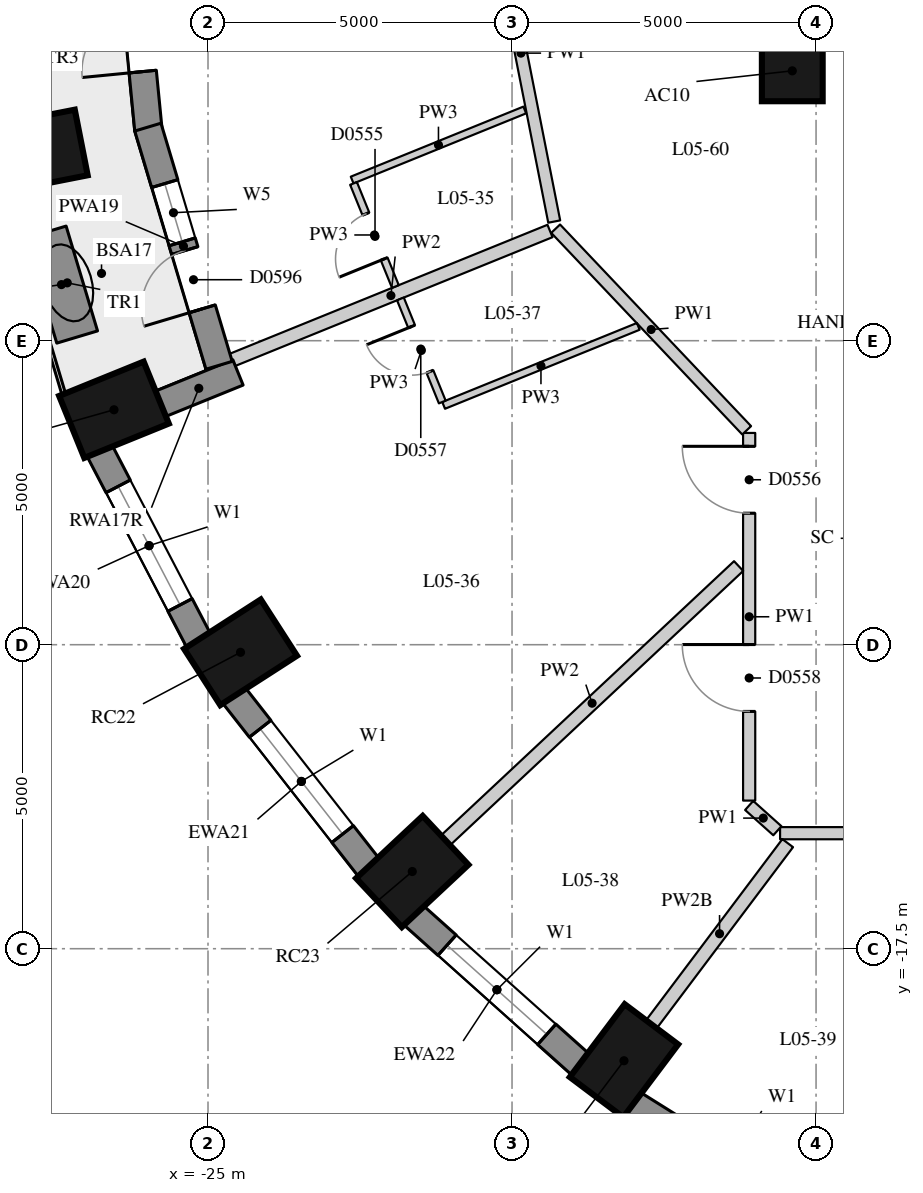
"""IFC4 building model, lengths in metres.
Left out: names, types, materials, properties, quantities, classifications, styles, units other than length and angle.
Written with IfcOpenShell. Run it as: python <this file> out.ifc"""

import sys

from ifc_helpers import new_model, si_unit, direction, frame, frame_2d, origin, origin_2d, place, context, subcontext, project, spatial, rectangle, extrude, element, fill, save


model = new_model("IFC4")
c1 = context("Model", 3, precision=1e-05, world=origin(), true_north=direction((0.0, 1.0)))
c2 = subcontext(c1, "Body", "Model", "MODEL_VIEW")
j1 = project(units=[si_unit("LENGTHUNIT", "METRE"), si_unit("PLANEANGLEUNIT", "RADIAN")], contexts=[c1])
p1 = place(None, origin())
s1 = spatial("IfcSite", under=j1, at=p1, CompositionType="ELEMENT")
p2 = place(p1, origin())
s2 = spatial("IfcBuilding", under=s1, at=p2, CompositionType="ELEMENT")
p3 = place(p2, frame((0.0, 0.0, 25.0)))
s3 = spatial("IfcBuildingStorey", under=s2, at=p3, CompositionType="ELEMENT", Elevation=25.0)
for number, where, z_axis, x_axis in (
    (1, (-27.821, -4.385, 0.0), (0.0, 0.0, 1.0), (-0.981, -0.193, 0.0)),
    (2, (-26.546, -8.636, 0.0), (0.0, 0.0, 1.0), (-0.927, -0.376, 0.0)),
    (3, (-24.465, -12.625, 0.0), (0.0, 0.0, 1.0), (-0.841, -0.541, 0.0)),
    (4, (-21.641, -16.23, 0.0), (0.0, 0.0, 1.0), (-0.73, -0.683, 0.0)),
    (5, (-18.159, -19.343, 0.0), (0.0, 0.0, 1.0), (-0.601, -0.799, 0.0)),
):
    element("IfcColumn", number, at=place(p3, frame(where, z_axis=z_axis, x_axis=x_axis)), inside=s3, PredefinedType="COLUMN", context=c2, shape_type="SweptSolid", body=[
        extrude(rectangle(XDim=1.5, YDim=1.1, at=origin_2d()), origin(), (0.0, 0.0, 1.0), 3.3),
    ])
p4 = place(p3, frame((-15.391, -3.062, 0.0), z_axis=(0.0, 0.0, 1.0), x_axis=(1.0, 0.0, 0.0)))
e6 = element("IfcColumn", 6, at=p4, inside=s3, PredefinedType="COLUMN", context=c2, shape_type="SweptSolid", body=[
    extrude(rectangle(XDim=1.0, YDim=1.0, at=origin_2d()), origin(), (0.0, 0.0, 1.0), 3.3),
])
p5 = place(p3, frame((-26.786, -9.305, 0.0), z_axis=(0.0, 0.0, 1.0), x_axis=(0.462492775226, -0.886623050041, 0.0)))
e7 = element("IfcWall", 7, at=p5, inside=s3, PredefinedType="SOLIDWALL", context=c2, shape_type="SweptSolid", body=[
    extrude(rectangle(XDim=3.532, YDim=0.45, at=frame_2d((1.766, 0.0))), origin(), (0.0, 0.0, 1.0), 3.02),
])
p6 = place(p5, frame((0.666, 0.0, 0.4)))
e8 = element("IfcOpeningElement", 8, at=p6, cuts=e7, PredefinedType="OPENING", context=c2, shape_type="SweptSolid", body=[
    extrude(rectangle(XDim=2.2, YDim=1.75, at=frame_2d((1.1, 0.875))), frame((0.0, 0.235, 0.0), z_axis=(0.0, -1.0, 0.0), x_axis=(1.0, 0.0, 0.0)), (0.0, 0.0, 1.0), 0.47),
])
p7 = place(p3, frame((-24.578, -13.328, 0.0), z_axis=(0.0, 0.0, 1.0), x_axis=(0.616661975264, -0.787228053529, 0.0)))
e9 = element("IfcWall", 9, at=p7, inside=s3, PredefinedType="SOLIDWALL", context=c2, shape_type="SweptSolid", body=[
    extrude(rectangle(XDim=3.61, YDim=0.45, at=frame_2d((1.805, 0.0))), origin(), (0.0, 0.0, 1.0), 3.02),
])
p8 = place(p7, frame((0.705, 0.0, 0.4)))
e10 = element("IfcOpeningElement", 10, at=p8, cuts=e9, PredefinedType="OPENING", context=c2, shape_type="SweptSolid", body=[
    extrude(rectangle(XDim=2.2, YDim=1.75, at=frame_2d((1.1, 0.875))), frame((0.0, 0.235, 0.0), z_axis=(0.0, -1.0, 0.0), x_axis=(1.0, 0.0, 0.0)), (0.0, 0.0, 1.0), 0.47),
])
p9 = place(p3, frame((-21.627, -16.943, 0.0), z_axis=(0.0, 0.0, 1.0), x_axis=(0.745526233716, -0.66647628228, 0.0)))
e11 = element("IfcWall", 11, at=p9, inside=s3, PredefinedType="SOLIDWALL", context=c2, shape_type="SweptSolid", body=[
    extrude(rectangle(XDim=3.697, YDim=0.45, at=frame_2d((1.848, 0.0))), origin(), (0.0, 0.0, 1.0), 3.02),
])
p10 = place(p9, frame((0.749, 0.0, 0.4)))
e12 = element("IfcOpeningElement", 12, at=p10, cuts=e11, PredefinedType="OPENING", context=c2, shape_type="SweptSolid", body=[
    extrude(rectangle(XDim=2.2, YDim=1.75, at=frame_2d((1.1, 0.875))), frame((0.0, 0.235, 0.0), z_axis=(0.0, -1.0, 0.0), x_axis=(1.0, 0.0, 0.0)), (0.0, 0.0, 1.0), 0.47),
])
p11 = place(p3, frame((-18.023, -20.044, 0.0), z_axis=(0.0, 0.0, 1.0), x_axis=(0.847635480093, -0.530579016629, 0.0)))
e13 = element("IfcWall", 13, at=p11, inside=s3, PredefinedType="SOLIDWALL", context=c2, shape_type="SweptSolid", body=[
    extrude(rectangle(XDim=3.782, YDim=0.45, at=frame_2d((1.891, 0.0))), origin(), (0.0, 0.0, 1.0), 3.02),
])
p12 = place(p11, frame((0.791, 0.0, 0.4)))
e14 = element("IfcOpeningElement", 14, at=p12, cuts=e13, PredefinedType="OPENING", context=c2, shape_type="SweptSolid", body=[
    extrude(rectangle(XDim=2.2, YDim=1.75, at=frame_2d((1.1, 0.875))), frame((0.0, 0.235, 0.0), z_axis=(0.0, -1.0, 0.0), x_axis=(1.0, 0.0, 0.0)), (0.0, 0.0, 1.0), 0.47),
])
p13 = place(p3, frame((-25.796, -8.544, 0.0), z_axis=(0.0, 0.0, 1.0), x_axis=(0.926575599743, 0.376108572039, 0.0)))
e15 = element("IfcWall", 15, at=p13, inside=s3, PredefinedType="SOLIDWALL", context=c2, shape_type="SweptSolid", body=[
    extrude(rectangle(XDim=1.39, YDim=0.45, at=frame_2d((0.695, 0.0))), origin(), (0.0, 0.0, 1.0), 3.02),
])
p14 = place(p3, frame((-26.376, 0.022, 0.0), z_axis=(0.0, 0.0, 1.0), x_axis=(0.097092719726, -0.995275340685, 0.0)))
e16 = element("IfcWall", 16, at=p14, inside=s3, PredefinedType="SOLIDWALL", context=c2, shape_type="SweptSolid", body=[
    extrude(rectangle(XDim=4.071, YDim=0.45, at=frame_2d((2.036, 0.0))), origin(), (0.0, 0.0, 1.0), 3.02),
])
p15 = place(p14, frame((0.96, 0.0, 0.4)))
e17 = element("IfcOpeningElement", 17, at=p15, cuts=e16, PredefinedType="OPENING", context=c2, shape_type="SweptSolid", body=[
    extrude(rectangle(XDim=1.0, YDim=1.75, at=frame_2d((0.5, 0.875))), frame((0.0, 0.235, 0.0), z_axis=(0.0, -1.0, 0.0), x_axis=(1.0, 0.0, 0.0)), (0.0, 0.0, 1.0), 0.47),
])
p16 = place(p14, frame((2.111, 0.0, 0.0)))
e18 = element("IfcOpeningElement", 18, at=p16, cuts=e16, PredefinedType="OPENING", context=c2, shape_type="SweptSolid", body=[
    extrude(rectangle(XDim=1.0, YDim=2.15, at=frame_2d((0.5, 1.075))), frame((0.0, 0.235, 0.0), z_axis=(0.0, -1.0, 0.0), x_axis=(1.0, 0.0, 0.0)), (0.0, 0.0, 1.0), 0.47),
])
p17 = place(p3, frame((-25.989, -3.987, 0.0), z_axis=(0.0, 0.0, 1.0), x_axis=(0.286427456555, -0.958101932015, 0.0)))
e19 = element("IfcWall", 19, at=p17, inside=s3, PredefinedType="SOLIDWALL", context=c2, shape_type="SweptSolid", body=[
    extrude(rectangle(XDim=4.089, YDim=0.45, at=frame_2d((2.044, 0.0))), origin(), (0.0, 0.0, 1.0), 3.02),
])
p18 = place(p17, frame((0.969, 0.0, 0.4)))
e20 = element("IfcOpeningElement", 20, at=p18, cuts=e19, PredefinedType="OPENING", context=c2, shape_type="SweptSolid", body=[
    extrude(rectangle(XDim=1.0, YDim=1.75, at=frame_2d((0.5, 0.875))), frame((0.0, 0.235, 0.0), z_axis=(0.0, -1.0, 0.0), x_axis=(1.0, 0.0, 0.0)), (0.0, 0.0, 1.0), 0.47),
])
p19 = place(p17, frame((2.119, 0.0, 0.0)))
e21 = element("IfcOpeningElement", 21, at=p19, cuts=e19, PredefinedType="OPENING", context=c2, shape_type="SweptSolid", body=[
    extrude(rectangle(XDim=1.0, YDim=2.15, at=frame_2d((0.5, 1.075))), frame((0.0, 0.235, 0.0), z_axis=(0.0, -1.0, 0.0), x_axis=(1.0, 0.0, 0.0)), (0.0, 0.0, 1.0), 0.47),
])
p20 = place(p3, frame((-27.669, -5.715, 0.0), z_axis=(0.0, 0.0, 1.0), x_axis=(0.287024312863, -0.957923297465, 0.0)))
e22 = element("IfcWall", 22, at=p20, inside=s3, PredefinedType="USERDEFINED", context=c2, shape_type="SweptSolid", body=[
    extrude(rectangle(XDim=1.8, YDim=0.7, at=frame_2d((0.9, 0.0))), origin(), (0.0, 0.0, 1.0), 0.75),
])
p21 = place(p3, frame((-7.92, -15.6, 0.0), z_axis=(0.0, 0.0, 1.0), x_axis=(-1.0, 0.0, 0.0)))
e23 = element("IfcWall", 23, at=p21, inside=s3, PredefinedType="PARTITIONING", context=c2, shape_type="SweptSolid", body=[
    extrude(rectangle(XDim=7.672, YDim=0.2, at=frame_2d((3.836, 0.0))), origin(), (0.0, 0.0, 1.0), 3.02),
])
p22 = place(p21, frame((5.537, 0.0, 0.0)))
e24 = element("IfcOpeningElement", 24, at=p22, cuts=e23, PredefinedType="OPENING", context=c2, shape_type="SweptSolid", body=[
    extrude(rectangle(XDim=1.0, YDim=2.1, at=frame_2d((0.5, 1.05))), frame((0.0, 0.11, 0.0), z_axis=(0.0, -1.0, 0.0), x_axis=(1.0, 0.0, 0.0)), (0.0, 0.0, 1.0), 0.22),
])
p23 = place(p21, frame((1.036, 0.0, 0.0)))
e25 = element("IfcOpeningElement", 25, at=p23, cuts=e23, PredefinedType="OPENING", context=c2, shape_type="SweptSolid", body=[
    extrude(rectangle(XDim=0.9, YDim=2.1, at=frame_2d((0.45, 1.05))), frame((0.0, 0.11, 0.0), z_axis=(0.0, -1.0, 0.0), x_axis=(1.0, 0.0, 0.0)), (0.0, 0.0, 1.0), 0.22),
])
p24 = place(p3, frame((-15.636, -15.56, 0.0), z_axis=(0.0, 0.0, 1.0), x_axis=(-0.744656758283, 0.667447610187, 0.0)))
e26 = element("IfcWall", 26, at=p24, inside=s3, PredefinedType="PARTITIONING", context=c2, shape_type="SweptSolid", body=[
    extrude(rectangle(XDim=0.623, YDim=0.2, at=frame_2d((0.312, 0.0))), origin(), (0.0, 0.0, 1.0), 3.02),
])
p25 = place(p3, frame((-16.1, -15.064, 0.0), z_axis=(0.0, 0.0, 1.0), x_axis=(0.0, 1.0, 0.0)))
e27 = element("IfcWall", 27, at=p25, inside=s3, PredefinedType="PARTITIONING", context=c2, shape_type="SweptSolid", body=[
    extrude(rectangle(XDim=6.047, YDim=0.2, at=frame_2d((3.023, 0.0))), origin(), (0.0, 0.0, 1.0), 3.02),
])
p26 = place(p25, frame((4.727, 0.0, 0.0)))
e28 = element("IfcOpeningElement", 28, at=p26, cuts=e27, PredefinedType="OPENING", context=c2, shape_type="SweptSolid", body=[
    extrude(rectangle(XDim=1.1, YDim=2.1, at=frame_2d((0.55, 1.05))), frame((0.0, 0.11, 0.0), z_axis=(0.0, -1.0, 0.0), x_axis=(1.0, 0.0, 0.0)), (0.0, 0.0, 1.0), 0.22),
])
p27 = place(p25, frame((1.467, 0.0, 0.0)))
e29 = element("IfcOpeningElement", 29, at=p27, cuts=e27, PredefinedType="OPENING", context=c2, shape_type="SweptSolid", body=[
    extrude(rectangle(XDim=1.1, YDim=2.1, at=frame_2d((0.55, 1.05))), frame((0.0, 0.11, 0.0), z_axis=(0.0, -1.0, 0.0), x_axis=(1.0, 0.0, 0.0)), (0.0, 0.0, 1.0), 0.22),
])
p28 = place(p3, frame((-16.141, -8.974, 0.0), z_axis=(0.0, 0.0, 1.0), x_axis=(-0.687741683024, 0.725955492735, 0.0)))
e30 = element("IfcWall", 30, at=p28, inside=s3, PredefinedType="PARTITIONING", context=c2, shape_type="SweptSolid", body=[
    extrude(rectangle(XDim=4.568, YDim=0.2, at=frame_2d((2.284, 0.0))), origin(), (0.0, 0.0, 1.0), 3.02),
])
p29 = place(p3, frame((-19.306, -5.541, 0.0), z_axis=(0.0, 0.0, 1.0), x_axis=(-0.193671356151, 0.981066463501, 0.0)))
e31 = element("IfcWall", 31, at=p29, inside=s3, PredefinedType="PARTITIONING", context=c2, shape_type="SweptSolid", body=[
    extrude(rectangle(XDim=5.647, YDim=0.2, at=frame_2d((2.824, 0.0))), origin(), (0.0, 0.0, 1.0), 3.02),
])
p30 = place(p3, frame((-24.608, -7.82, 0.0), z_axis=(0.0, 0.0, 1.0), x_axis=(0.926565467624, 0.376133532415, 0.0)))
e32 = element("IfcWall", 32, at=p30, inside=s3, PredefinedType="PARTITIONING", context=c2, shape_type="SweptSolid", body=[
    extrude(rectangle(XDim=5.648, YDim=0.22, at=frame_2d((2.824, 0.0))), origin(), (0.0, 0.0, 1.0), 3.02),
])
p31 = place(p3, frame((-21.093, -15.718, 0.0), z_axis=(0.0, 0.0, 1.0), x_axis=(0.73009284205, 0.683347965525, 0.0)))
e33 = element("IfcWall", 33, at=p31, inside=s3, PredefinedType="PARTITIONING", context=c2, shape_type="SweptSolid", body=[
    extrude(rectangle(XDim=6.602, YDim=0.22, at=frame_2d((3.301, 0.0))), origin(), (0.0, 0.0, 1.0), 3.02),
])
p32 = place(p3, frame((-17.708, -18.743, 0.0), z_axis=(0.0, 0.0, 1.0), x_axis=(0.601172757903, 0.799119086967, 0.0)))
e34 = element("IfcWall", 34, at=p32, inside=s3, PredefinedType="PARTITIONING", context=c2, shape_type="SweptSolid", body=[
    extrude(rectangle(XDim=3.729, YDim=0.22, at=frame_2d((1.864, 0.0))), origin(), (0.0, 0.0, 1.0), 2.57),
])
p33 = place(p3, frame((-19.79, -3.705, 0.0), z_axis=(0.0, 0.0, 1.0), x_axis=(-0.926585481443, -0.37608422671, 0.0)))
e35 = element("IfcWall", 35, at=p33, inside=s3, PredefinedType="PARTITIONING", context=c2, shape_type="SweptSolid", body=[
    extrude(rectangle(XDim=3.064, YDim=0.12, at=frame_2d((1.532, 0.0))), origin(), (0.0, 0.0, 1.0), 3.02),
])
p34 = place(p3, frame((-17.924, -7.264, 0.0), z_axis=(0.0, 0.0, 1.0), x_axis=(-0.926548953408, -0.376174210891, 0.0)))
e36 = element("IfcWall", 36, at=p34, inside=s3, PredefinedType="PARTITIONING", context=c2, shape_type="SweptSolid", body=[
    extrude(rectangle(XDim=3.455, YDim=0.12, at=frame_2d((1.727, 0.0))), origin(), (0.0, 0.0, 1.0), 3.02),
])
p35 = place(p3, frame((-22.607, -4.913, 0.0), z_axis=(0.0, 0.0, 1.0), x_axis=(0.376216010002, -0.92653198208, 0.0)))
e37 = element("IfcWall", 37, at=p35, inside=s3, PredefinedType="PARTITIONING", context=c2, shape_type="SweptSolid", body=[
    extrude(rectangle(XDim=1.83, YDim=0.12, at=frame_2d((0.915, 0.0))), origin(), (0.0, 0.0, 1.0), 3.02),
])
p36 = place(p35, frame((0.54, 0.0, 0.0)))
e38 = element("IfcOpeningElement", 38, at=p36, cuts=e37, PredefinedType="OPENING", context=c2, shape_type="SweptSolid", body=[
    extrude(rectangle(XDim=0.8, YDim=2.1, at=frame_2d((0.4, 1.05))), frame((0.0, 0.07, 0.0), z_axis=(0.0, -1.0, 0.0), x_axis=(1.0, 0.0, 0.0)), (0.0, 0.0, 1.0), 0.14),
])
p37 = place(p3, frame((-21.147, -8.508, 0.0), z_axis=(0.0, 0.0, 1.0), x_axis=(-0.376216010002, 0.92653198208, 0.0)))
e39 = element("IfcWall", 39, at=p37, inside=s3, PredefinedType="PARTITIONING", context=c2, shape_type="SweptSolid", body=[
    extrude(rectangle(XDim=1.83, YDim=0.12, at=frame_2d((0.915, 0.0))), origin(), (0.0, 0.0, 1.0), 3.02),
])
p38 = place(p37, frame((0.54, 0.0, 0.0)))
e40 = element("IfcOpeningElement", 40, at=p38, cuts=e39, PredefinedType="OPENING", context=c2, shape_type="SweptSolid", body=[
    extrude(rectangle(XDim=0.8, YDim=2.1, at=frame_2d((0.4, 1.05))), frame((0.0, 0.07, 0.0), z_axis=(0.0, -1.0, 0.0), x_axis=(1.0, 0.0, 0.0)), (0.0, 0.0, 1.0), 0.14),
])
p39 = place(p6, origin())
e41 = element("IfcWindow", 41, at=p39, inside=s3, PartitioningType="SINGLE_PANEL", PredefinedType="WINDOW", context=c2, shape_type="SweptSolid", body=[
    extrude(rectangle(XDim=2.2, YDim=1.75, at=frame_2d((1.1, 0.875))), frame((0.0, 0.035, 0.0), z_axis=(0.0, -1.0, 0.0), x_axis=(1.0, 0.0, 0.0)), (0.0, 0.0, 1.0), 0.06),
])
fill(e8, e41)
p40 = place(p8, origin())
e42 = element("IfcWindow", 42, at=p40, inside=s3, PartitioningType="SINGLE_PANEL", PredefinedType="WINDOW", context=c2, shape_type="SweptSolid", body=[
    extrude(rectangle(XDim=2.2, YDim=1.75, at=frame_2d((1.1, 0.875))), frame((0.0, 0.035, 0.0), z_axis=(0.0, -1.0, 0.0), x_axis=(1.0, 0.0, 0.0)), (0.0, 0.0, 1.0), 0.06),
])
fill(e10, e42)
p41 = place(p10, origin())
e43 = element("IfcWindow", 43, at=p41, inside=s3, PartitioningType="SINGLE_PANEL", PredefinedType="WINDOW", context=c2, shape_type="SweptSolid", body=[
    extrude(rectangle(XDim=2.2, YDim=1.75, at=frame_2d((1.1, 0.875))), frame((0.0, 0.035, 0.0), z_axis=(0.0, -1.0, 0.0), x_axis=(1.0, 0.0, 0.0)), (0.0, 0.0, 1.0), 0.06),
])
fill(e12, e43)
p42 = place(p16, frame((1.0, 0.0, 0.0), z_axis=(0.0, 0.0, 1.0), x_axis=(-1.0, 0.0, 0.0)))
e44 = element("IfcDoor", 44, at=p42, inside=s3, OperationType="SINGLE_SWING_LEFT", PredefinedType="DOOR", context=c2, shape_type="SweptSolid", body=[
    extrude(rectangle(XDim=1.0, YDim=2.15, at=frame_2d((0.5, 1.075))), frame((0.0, 0.075, 0.0), z_axis=(0.0, -1.0, 0.0), x_axis=(1.0, 0.0, 0.0)), (0.0, 0.0, 1.0), 0.05),
])
fill(e18, e44)
p43 = place(p18, origin())
e45 = element("IfcWindow", 45, at=p43, inside=s3, PartitioningType="SINGLE_PANEL", PredefinedType="WINDOW", context=c2, shape_type="SweptSolid", body=[
    extrude(rectangle(XDim=1.0, YDim=1.75, at=frame_2d((0.5, 0.875))), frame((0.0, 0.035, 0.0), z_axis=(0.0, -1.0, 0.0), x_axis=(1.0, 0.0, 0.0)), (0.0, 0.0, 1.0), 0.06),
])
fill(e20, e45)
p44 = place(p19, frame((1.0, 0.0, 0.0), z_axis=(0.0, 0.0, 1.0), x_axis=(-1.0, 0.0, 0.0)))
e46 = element("IfcDoor", 46, at=p44, inside=s3, OperationType="SINGLE_SWING_LEFT", PredefinedType="DOOR", context=c2, shape_type="SweptSolid", body=[
    extrude(rectangle(XDim=1.0, YDim=2.15, at=frame_2d((0.5, 1.075))), frame((0.0, 0.075, 0.0), z_axis=(0.0, -1.0, 0.0), x_axis=(1.0, 0.0, 0.0)), (0.0, 0.0, 1.0), 0.05),
])
fill(e21, e46)
p45 = place(p36, origin())
e47 = element("IfcDoor", 47, at=p45, inside=s3, OperationType="SINGLE_SWING_LEFT", PredefinedType="DOOR", context=c2, shape_type="SweptSolid", body=[
    extrude(rectangle(XDim=0.8, YDim=2.1, at=frame_2d((0.4, 1.05))), frame((0.0, 0.025, 0.0), z_axis=(0.0, -1.0, 0.0), x_axis=(1.0, 0.0, 0.0)), (0.0, 0.0, 1.0), 0.05),
])
fill(e38, e47)
p46 = place(p26, origin())
e48 = element("IfcDoor", 48, at=p46, inside=s3, OperationType="SINGLE_SWING_RIGHT", PredefinedType="DOOR", context=c2, shape_type="SweptSolid", body=[
    extrude(rectangle(XDim=1.1, YDim=2.1, at=frame_2d((0.55, 1.05))), frame((0.0, 0.025, 0.0), z_axis=(0.0, -1.0, 0.0), x_axis=(1.0, 0.0, 0.0)), (0.0, 0.0, 1.0), 0.05),
])
fill(e28, e48)
p47 = place(p38, origin())
e49 = element("IfcDoor", 49, at=p47, inside=s3, OperationType="SINGLE_SWING_RIGHT", PredefinedType="DOOR", context=c2, shape_type="SweptSolid", body=[
    extrude(rectangle(XDim=0.8, YDim=2.1, at=frame_2d((0.4, 1.05))), frame((0.0, 0.025, 0.0), z_axis=(0.0, -1.0, 0.0), x_axis=(1.0, 0.0, 0.0)), (0.0, 0.0, 1.0), 0.05),
])
fill(e40, e49)
p48 = place(p27, origin())
e50 = element("IfcDoor", 50, at=p48, inside=s3, OperationType="SINGLE_SWING_RIGHT", PredefinedType="DOOR", context=c2, shape_type="SweptSolid", body=[
    extrude(rectangle(XDim=1.1, YDim=2.1, at=frame_2d((0.55, 1.05))), frame((0.0, 0.025, 0.0), z_axis=(0.0, -1.0, 0.0), x_axis=(1.0, 0.0, 0.0)), (0.0, 0.0, 1.0), 0.05),
])
fill(e29, e50)
save(model, sys.argv[1])
